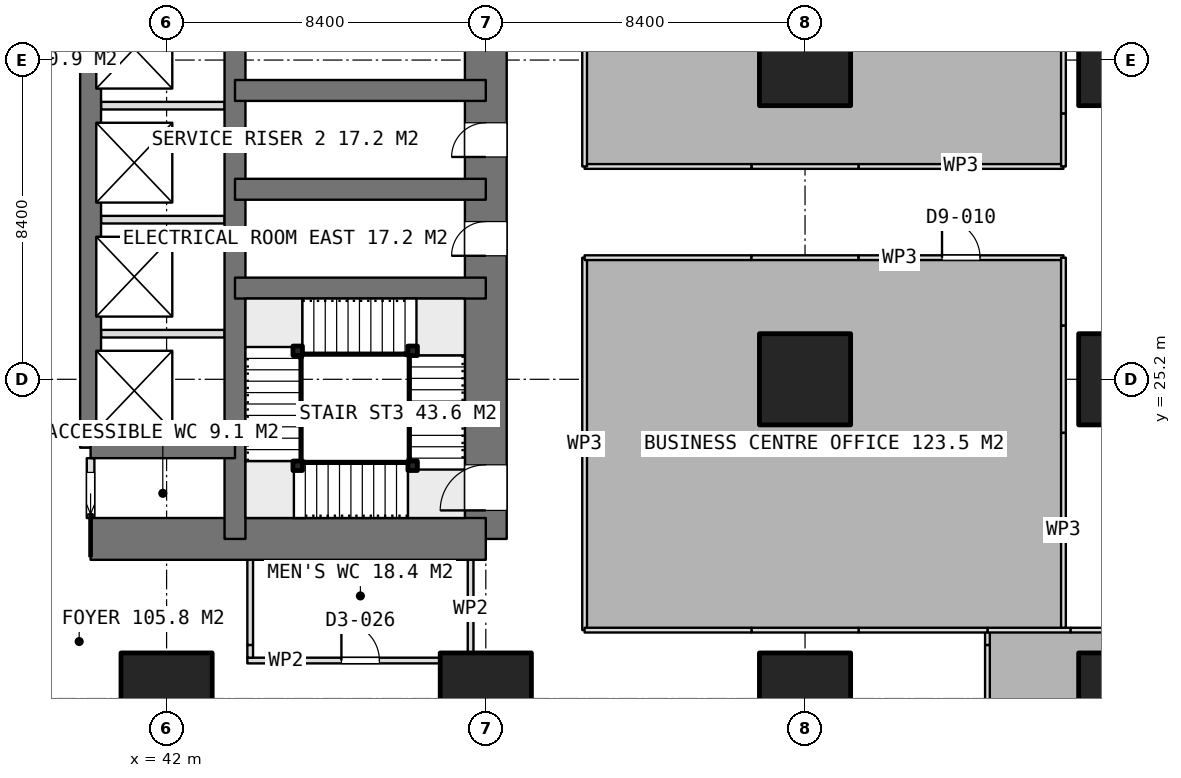
"""IFC4 building model, lengths in metres.
Left out: names, types, materials, properties, quantities, classifications, styles, units other than length and angle.
Written with IfcOpenShell. Run it as: python <this file> out.ifc"""

import sys

from ifc_helpers import new_model, si_unit, direction, frame, frame_2d, origin, origin_2d, place, context, subcontext, project, spatial, rectangle, extrude, element, fill, save


model = new_model("IFC4")
c1 = context("Model", 3, precision=1e-05, world=origin(), true_north=direction((0.0, 1.0)))
c2 = subcontext(c1, "Body", "Model", "MODEL_VIEW")
j1 = project(units=[si_unit("LENGTHUNIT", "METRE"), si_unit("PLANEANGLEUNIT", "RADIAN")], contexts=[c1])
p1 = place(None, origin())
s1 = spatial("IfcSite", under=j1, at=p1, CompositionType="ELEMENT")
p2 = place(p1, origin())
s2 = spatial("IfcBuilding", under=s1, at=p2, CompositionType="ELEMENT")
p3 = place(p2, frame((0.0, 0.0, 20.4)))
s3 = spatial("IfcBuildingStorey", under=s2, at=p3, CompositionType="ELEMENT", Elevation=20.4)
p4 = place(p3, frame((40.0, 21.0, 0.0), z_axis=(0.0, 0.0, 1.0), x_axis=(1.0, 0.0, 0.0)))
e1 = element("IfcWall", 1, at=p4, inside=s3, PredefinedType="SHEAR", context=c2, shape_type="SweptSolid", body=[
    extrude(rectangle(XDim=10.4, YDim=1.1, at=frame_2d((5.2, 0.0))), origin(), (0.0, 0.0, 1.0), 5.0),
])
p5 = place(p3, frame((50.4, 21.0, 0.0), z_axis=(0.0, 0.0, 1.0), x_axis=(0.0, 1.0, 0.0)))
e2 = element("IfcWall", 2, at=p5, inside=s3, PredefinedType="SHEAR", context=c2, shape_type="SweptSolid", body=[
    extrude(rectangle(XDim=25.2, YDim=1.1, at=frame_2d((12.6, 0.0))), origin(), (0.0, 0.0, 1.0), 5.0),
])
p6 = place(p5, frame((16.2, 0.0, 0.0)))
e3 = element("IfcOpeningElement", 3, at=p6, cuts=e2, PredefinedType="OPENING", context=c2, shape_type="SweptSolid", body=[
    extrude(rectangle(XDim=1.2, YDim=2.1, at=frame_2d((0.6, 1.05))), frame((0.0, 0.56, 0.0), z_axis=(0.0, -1.0, 0.0), x_axis=(1.0, 0.0, 0.0)), (0.0, 0.0, 1.0), 1.12),
])
p7 = place(p5, frame((10.05, 0.0, 0.0)))
e4 = element("IfcOpeningElement", 4, at=p7, cuts=e2, PredefinedType="OPENING", context=c2, shape_type="SweptSolid", body=[
    extrude(rectangle(XDim=0.9, YDim=2.1, at=frame_2d((0.45, 1.05))), frame((0.0, 0.56, 0.0), z_axis=(0.0, -1.0, 0.0), x_axis=(1.0, 0.0, 0.0)), (0.0, 0.0, 1.0), 1.12),
])
p8 = place(p5, frame((7.45, 0.0, 0.0)))
e5 = element("IfcOpeningElement", 5, at=p8, cuts=e2, PredefinedType="OPENING", context=c2, shape_type="SweptSolid", body=[
    extrude(rectangle(XDim=0.9, YDim=2.1, at=frame_2d((0.45, 1.05))), frame((0.0, 0.56, 0.0), z_axis=(0.0, -1.0, 0.0), x_axis=(1.0, 0.0, 0.0)), (0.0, 0.0, 1.0), 1.12),
])
p9 = place(p5, frame((0.75, 0.0, 0.0)))
e6 = element("IfcOpeningElement", 6, at=p9, cuts=e2, PredefinedType="OPENING", context=c2, shape_type="SweptSolid", body=[
    extrude(rectangle(XDim=1.2, YDim=2.1, at=frame_2d((0.6, 1.05))), frame((0.0, 0.56, 0.0), z_axis=(0.0, -1.0, 0.0), x_axis=(1.0, 0.0, 0.0)), (0.0, 0.0, 1.0), 1.12),
])
p10 = place(p3, frame((43.8, 21.0, 0.0), z_axis=(0.0, 0.0, 1.0), x_axis=(0.0, 1.0, 0.0)))
e7 = element("IfcWall", 7, at=p10, inside=s3, PredefinedType="SHEAR", context=c2, shape_type="SweptSolid", body=[
    extrude(rectangle(XDim=25.2, YDim=0.55, at=frame_2d((12.6, 0.0))), origin(), (0.0, 0.0, 1.0), 5.0),
])
p11 = place(p3, frame((40.0, 23.4, 0.0), z_axis=(0.0, 0.0, 1.0), x_axis=(0.0, 1.0, 0.0)))
e8 = element("IfcWall", 8, at=p11, inside=s3, PredefinedType="SHEAR", context=c2, shape_type="SweptSolid", body=[
    extrude(rectangle(XDim=18.0, YDim=0.55, at=frame_2d((9.0, 0.0))), origin(), (0.0, 0.0, 1.0), 5.0),
])
p12 = place(p3, frame((40.0, 23.4, 0.0), z_axis=(0.0, 0.0, 1.0), x_axis=(1.0, 0.0, 0.0)))
e9 = element("IfcWall", 9, at=p12, inside=s3, PredefinedType="SHEAR", context=c2, shape_type="SweptSolid", body=[
    extrude(rectangle(XDim=3.8, YDim=0.55, at=frame_2d((1.9, 0.0))), origin(), (0.0, 0.0, 1.0), 5.0),
])
for number, where, z_axis, x_axis in (
    (10, (43.8, 27.6, 0.0), (0.0, 0.0, 1.0), (1.0, 0.0, 0.0)),
    (11, (43.8, 30.2, 0.0), (0.0, 0.0, 1.0), (1.0, 0.0, 0.0)),
    (12, (43.8, 32.8, 0.0), (0.0, 0.0, 1.0), (1.0, 0.0, 0.0)),
):
    element("IfcWall", number, at=place(p3, frame(where, z_axis=z_axis, x_axis=x_axis)), inside=s3, PredefinedType="SHEAR", context=c2, shape_type="SweptSolid", body=[
        extrude(rectangle(XDim=6.6, YDim=0.55, at=frame_2d((3.3, 0.0))), origin(), (0.0, 0.0, 1.0), 5.0),
    ])
for number, where, z_axis, x_axis in (
    (13, (42.0, 16.8, 0.0), (0.0, 0.0, 1.0), (1.0, 0.0, 0.0)),
    (14, (50.4, 16.8, 0.0), (0.0, 0.0, 1.0), (1.0, 0.0, 0.0)),
    (15, (58.8, 16.8, 0.0), (0.0, 0.0, 1.0), (1.0, 0.0, 0.0)),
    (16, (58.8, 25.2, 0.0), (0.0, 0.0, 1.0), (1.0, 0.0, 0.0)),
    (17, (58.8, 33.6, 0.0), (0.0, 0.0, 1.0), (1.0, 0.0, 0.0)),
    (18, (67.2, 16.8, 0.0), (0.0, 0.0, 1.0), (1.0, 0.0, 0.0)),
    (19, (67.2, 25.2, 0.0), (0.0, 0.0, 1.0), (1.0, 0.0, 0.0)),
    (20, (67.2, 33.6, 0.0), (0.0, 0.0, 1.0), (1.0, 0.0, 0.0)),
):
    element("IfcColumn", number, at=place(p3, frame(where, z_axis=z_axis, x_axis=x_axis)), inside=s3, PredefinedType="COLUMN", context=c2, shape_type="SweptSolid", body=[
        extrude(rectangle(XDim=2.4, YDim=2.4, at=origin_2d()), origin(), (0.0, 0.0, 1.0), 5.0),
    ])
for number, where, z_axis, x_axis in (
    (21, (40.275, 26.4, 0.0), (0.0, 0.0, 1.0), (1.0, 0.0, 0.0)),
    (22, (40.275, 29.4, 0.0), (0.0, 0.0, 1.0), (1.0, 0.0, 0.0)),
    (23, (40.275, 32.4, 0.0), (0.0, 0.0, 1.0), (1.0, 0.0, 0.0)),
):
    element("IfcWall", number, at=place(p3, frame(where, z_axis=z_axis, x_axis=x_axis)), inside=s3, PredefinedType="PARTITIONING", context=c2, shape_type="SweptSolid", body=[
        extrude(rectangle(XDim=3.25, YDim=0.2, at=frame_2d((1.625, 0.0))), origin(), (0.0, 0.0, 1.0), 4.6),
    ])
p13 = place(p3, frame((40.0, 21.55, 0.0), z_axis=(0.0, 0.0, 1.0), x_axis=(0.0, 1.0, 0.0)))
e24 = element("IfcWall", 24, at=p13, inside=s3, PredefinedType="PARTITIONING", context=c2, shape_type="SweptSolid", body=[
    extrude(rectangle(XDim=1.575, YDim=0.2, at=frame_2d((0.788, 0.0))), origin(), (0.0, 0.0, 1.0), 4.6),
])
p14 = place(p13, frame((0.1, 0.0, 0.0)))
e25 = element("IfcOpeningElement", 25, at=p14, cuts=e24, PredefinedType="OPENING", context=c2, shape_type="SweptSolid", body=[
    extrude(rectangle(XDim=1.1, YDim=2.1, at=frame_2d((0.55, 1.05))), frame((0.0, 0.11, 0.0), z_axis=(0.0, -1.0, 0.0), x_axis=(1.0, 0.0, 0.0)), (0.0, 0.0, 1.0), 0.22),
])
p15 = place(p3, frame((44.125, 17.8, 0.0), z_axis=(0.0, 0.0, 1.0), x_axis=(1.0, 0.0, 0.0)))
e26 = element("IfcWall", 26, at=p15, inside=s3, PredefinedType="PARTITIONING", context=c2, shape_type="SweptSolid", body=[
    extrude(rectangle(XDim=5.075, YDim=0.15, at=frame_2d((2.538, 0.0))), origin(), (0.0, 0.0, 1.0), 2.8),
])
p16 = place(p15, frame((2.475, 0.0, 0.0)))
e27 = element("IfcOpeningElement", 27, at=p16, cuts=e26, PredefinedType="OPENING", context=c2, shape_type="SweptSolid", body=[
    extrude(rectangle(XDim=1.0, YDim=2.1, at=frame_2d((0.5, 1.05))), frame((0.0, 0.085, 0.0), z_axis=(0.0, -1.0, 0.0), x_axis=(1.0, 0.0, 0.0)), (0.0, 0.0, 1.0), 0.17),
])
p17 = place(p3, frame((49.2, 17.8, 0.0), z_axis=(0.0, 0.0, 1.0), x_axis=(1.0, 0.0, 0.0)))
e28 = element("IfcWall", 28, at=p17, inside=s3, PredefinedType="PARTITIONING", context=c2, shape_type="SweptSolid", body=[
    extrude(rectangle(XDim=0.875, YDim=0.15, at=frame_2d((0.438, 0.0))), origin(), (0.0, 0.0, 1.0), 4.6),
])
p18 = place(p3, frame((44.2, 17.875, 0.0), z_axis=(0.0, 0.0, 1.0), x_axis=(0.0, 1.0, 0.0)))
e29 = element("IfcWall", 29, at=p18, inside=s3, PredefinedType="PARTITIONING", context=c2, shape_type="SweptSolid", body=[
    extrude(rectangle(XDim=0.335, YDim=0.15, at=frame_2d((0.167, 0.0))), origin(), (0.0, 0.0, 1.0), 2.8),
])
p19 = place(p3, frame((44.2, 18.21, 0.0), z_axis=(0.0, 0.0, 1.0), x_axis=(0.0, 1.0, 0.0)))
e30 = element("IfcWall", 30, at=p19, inside=s3, PredefinedType="PARTITIONING", context=c2, shape_type="SweptSolid", body=[
    extrude(rectangle(XDim=2.24, YDim=0.15, at=frame_2d((1.12, 0.0))), origin(), (0.0, 0.0, 1.0), 4.6),
])
p20 = place(p3, frame((50.0, 17.875, 0.0), z_axis=(0.0, 0.0, 1.0), x_axis=(0.0, 1.0, 0.0)))
e31 = element("IfcWall", 31, at=p20, inside=s3, PredefinedType="PARTITIONING", context=c2, shape_type="SweptSolid", body=[
    extrude(rectangle(XDim=2.575, YDim=0.15, at=frame_2d((1.288, 0.0))), origin(), (0.0, 0.0, 1.0), 4.6),
])
p21 = place(p3, frame((63.6, 15.39, 0.0), z_axis=(0.0, 0.0, 1.0), x_axis=(0.0, 1.0, 0.0)))
e32 = element("IfcWall", 32, at=p21, inside=s3, PredefinedType="PARTITIONING", context=c2, shape_type="SweptSolid", body=[
    extrude(rectangle(XDim=2.82, YDim=0.125, at=frame_2d((1.41, 0.0))), origin(), (0.0, 0.0, 1.0), 2.8),
])
p22 = place(p3, frame((63.6, 18.21, 0.0), z_axis=(0.0, 0.0, 1.0), x_axis=(0.0, 1.0, 0.0)))
e33 = element("IfcWall", 33, at=p22, inside=s3, PredefinedType="PARTITIONING", context=c2, shape_type="SweptSolid", body=[
    extrude(rectangle(XDim=0.39, YDim=0.125, at=frame_2d((0.195, 0.0))), origin(), (0.0, 0.0, 1.0), 4.6),
])
p23 = place(p3, frame((63.6, 18.6, 0.0), z_axis=(0.0, 0.0, 1.0), x_axis=(1.0, 0.0, 0.0)))
e34 = element("IfcWall", 34, at=p23, inside=s3, PredefinedType="PARTITIONING", context=c2, shape_type="SweptSolid", body=[
    extrude(rectangle(XDim=2.19, YDim=0.125, at=frame_2d((1.095, 0.0))), origin(), (0.0, 0.0, 1.0), 4.6),
])
p24 = place(p3, frame((65.79, 18.6, 0.0), z_axis=(0.0, 0.0, 1.0), x_axis=(1.0, 0.0, 0.0)))
e35 = element("IfcWall", 35, at=p24, inside=s3, PredefinedType="PARTITIONING", context=c2, shape_type="SweptSolid", body=[
    extrude(rectangle(XDim=2.82, YDim=0.125, at=frame_2d((1.41, 0.0))), origin(), (0.0, 0.0, 1.0), 2.8),
])
p25 = place(p3, frame((53.0, 18.6, 0.0), z_axis=(0.0, 0.0, 1.0), x_axis=(0.0, 1.0, 0.0)))
e36 = element("IfcWall", 36, at=p25, inside=s3, PredefinedType="PARTITIONING", context=c2, shape_type="SweptSolid", body=[
    extrude(rectangle(XDim=9.8, YDim=0.125, at=frame_2d((4.9, 0.0))), origin(), (0.0, 0.0, 1.0), 4.6),
])
p26 = place(p3, frame((53.0, 28.4, 0.0), z_axis=(0.0, 0.0, 1.0), x_axis=(1.0, 0.0, 0.0)))
e37 = element("IfcWall", 37, at=p26, inside=s3, PredefinedType="PARTITIONING", context=c2, shape_type="SweptSolid", body=[
    extrude(rectangle(XDim=4.39, YDim=0.125, at=frame_2d((2.195, 0.0))), origin(), (0.0, 0.0, 1.0), 4.6),
])
p27 = place(p3, frame((57.39, 28.4, 0.0), z_axis=(0.0, 0.0, 1.0), x_axis=(1.0, 0.0, 0.0)))
e38 = element("IfcWall", 38, at=p27, inside=s3, PredefinedType="PARTITIONING", context=c2, shape_type="SweptSolid", body=[
    extrude(rectangle(XDim=2.82, YDim=0.125, at=frame_2d((1.41, 0.0))), origin(), (0.0, 0.0, 1.0), 2.8),
])
p28 = place(p3, frame((60.21, 28.4, 0.0), z_axis=(0.0, 0.0, 1.0), x_axis=(1.0, 0.0, 0.0)))
e39 = element("IfcWall", 39, at=p28, inside=s3, PredefinedType="PARTITIONING", context=c2, shape_type="SweptSolid", body=[
    extrude(rectangle(XDim=5.39, YDim=0.125, at=frame_2d((2.695, 0.0))), origin(), (0.0, 0.0, 1.0), 4.6),
])
p29 = place(p28, frame((2.195, 0.0, 0.0)))
e40 = element("IfcOpeningElement", 40, at=p29, cuts=e39, PredefinedType="OPENING", context=c2, shape_type="SweptSolid", body=[
    extrude(rectangle(XDim=1.0, YDim=2.1, at=frame_2d((0.5, 1.05))), frame((0.0, 0.073, 0.0), z_axis=(0.0, -1.0, 0.0), x_axis=(1.0, 0.0, 0.0)), (0.0, 0.0, 1.0), 0.145),
])
p30 = place(p3, frame((65.6, 28.4, 0.0), z_axis=(0.0, 0.0, 1.0), x_axis=(0.0, -1.0, 0.0)))
e41 = element("IfcWall", 41, at=p30, inside=s3, PredefinedType="PARTITIONING", context=c2, shape_type="SweptSolid", body=[
    extrude(rectangle(XDim=1.79, YDim=0.125, at=frame_2d((0.895, 0.0))), origin(), (0.0, 0.0, 1.0), 4.6),
])
p31 = place(p3, frame((65.6, 26.61, 0.0), z_axis=(0.0, 0.0, 1.0), x_axis=(0.0, -1.0, 0.0)))
e42 = element("IfcWall", 42, at=p31, inside=s3, PredefinedType="PARTITIONING", context=c2, shape_type="SweptSolid", body=[
    extrude(rectangle(XDim=2.82, YDim=0.125, at=frame_2d((1.41, 0.0))), origin(), (0.0, 0.0, 1.0), 2.8),
])
p32 = place(p3, frame((65.6, 23.79, 0.0), z_axis=(0.0, 0.0, 1.0), x_axis=(0.0, -1.0, 0.0)))
e43 = element("IfcWall", 43, at=p32, inside=s3, PredefinedType="PARTITIONING", context=c2, shape_type="SweptSolid", body=[
    extrude(rectangle(XDim=5.127, YDim=0.125, at=frame_2d((2.563, 0.0))), origin(), (0.0, 0.0, 1.0), 4.6),
])
p33 = place(p3, frame((63.6, 18.6, 0.0), z_axis=(0.0, 0.0, 1.0), x_axis=(-1.0, 0.0, 0.0)))
e44 = element("IfcWall", 44, at=p33, inside=s3, PredefinedType="PARTITIONING", context=c2, shape_type="SweptSolid", body=[
    extrude(rectangle(XDim=3.39, YDim=0.125, at=frame_2d((1.695, 0.0))), origin(), (0.0, 0.0, 1.0), 4.6),
])
p34 = place(p3, frame((60.21, 18.6, 0.0), z_axis=(0.0, 0.0, 1.0), x_axis=(-1.0, 0.0, 0.0)))
e45 = element("IfcWall", 45, at=p34, inside=s3, PredefinedType="PARTITIONING", context=c2, shape_type="SweptSolid", body=[
    extrude(rectangle(XDim=2.82, YDim=0.125, at=frame_2d((1.41, 0.0))), origin(), (0.0, 0.0, 1.0), 2.8),
])
p35 = place(p3, frame((57.39, 18.6, 0.0), z_axis=(0.0, 0.0, 1.0), x_axis=(-1.0, 0.0, 0.0)))
e46 = element("IfcWall", 46, at=p35, inside=s3, PredefinedType="PARTITIONING", context=c2, shape_type="SweptSolid", body=[
    extrude(rectangle(XDim=4.39, YDim=0.125, at=frame_2d((2.195, 0.0))), origin(), (0.0, 0.0, 1.0), 4.6),
])
p36 = place(p3, frame((65.6, 30.8, 0.0), z_axis=(0.0, 0.0, 1.0), x_axis=(-1.0, 0.0, 0.0)))
e47 = element("IfcWall", 47, at=p36, inside=s3, PredefinedType="PARTITIONING", context=c2, shape_type="SweptSolid", body=[
    extrude(rectangle(XDim=5.39, YDim=0.125, at=frame_2d((2.695, 0.0))), origin(), (0.0, 0.0, 1.0), 4.6),
])
p37 = place(p3, frame((60.21, 30.8, 0.0), z_axis=(0.0, 0.0, 1.0), x_axis=(-1.0, 0.0, 0.0)))
e48 = element("IfcWall", 48, at=p37, inside=s3, PredefinedType="PARTITIONING", context=c2, shape_type="SweptSolid", body=[
    extrude(rectangle(XDim=2.82, YDim=0.125, at=frame_2d((1.41, 0.0))), origin(), (0.0, 0.0, 1.0), 2.8),
])
p38 = place(p3, frame((57.39, 30.8, 0.0), z_axis=(0.0, 0.0, 1.0), x_axis=(-1.0, 0.0, 0.0)))
e49 = element("IfcWall", 49, at=p38, inside=s3, PredefinedType="PARTITIONING", context=c2, shape_type="SweptSolid", body=[
    extrude(rectangle(XDim=4.39, YDim=0.125, at=frame_2d((2.195, 0.0))), origin(), (0.0, 0.0, 1.0), 4.6),
])
p39 = place(p3, frame((53.0, 30.8, 0.0), z_axis=(0.0, 0.0, 1.0), x_axis=(0.0, 1.0, 0.0)))
e50 = element("IfcWall", 50, at=p39, inside=s3, PredefinedType="PARTITIONING", context=c2, shape_type="SweptSolid", body=[
    extrude(rectangle(XDim=9.8, YDim=0.125, at=frame_2d((4.9, 0.0))), origin(), (0.0, 0.0, 1.0), 4.6),
])
p40 = place(p39, frame((4.4, 0.0, 0.0)))
e51 = element("IfcOpeningElement", 51, at=p40, cuts=e50, PredefinedType="OPENING", context=c2, shape_type="SweptSolid", body=[
    extrude(rectangle(XDim=1.0, YDim=2.1, at=frame_2d((0.5, 1.05))), frame((0.0, 0.073, 0.0), z_axis=(0.0, -1.0, 0.0), x_axis=(1.0, 0.0, 0.0)), (0.0, 0.0, 1.0), 0.145),
])
p41 = place(p3, frame((65.6, 35.01, 0.0), z_axis=(0.0, 0.0, 1.0), x_axis=(0.0, -1.0, 0.0)))
e52 = element("IfcWall", 52, at=p41, inside=s3, PredefinedType="PARTITIONING", context=c2, shape_type="SweptSolid", body=[
    extrude(rectangle(XDim=2.82, YDim=0.125, at=frame_2d((1.41, 0.0))), origin(), (0.0, 0.0, 1.0), 2.8),
])
p42 = place(p3, frame((65.6, 32.19, 0.0), z_axis=(0.0, 0.0, 1.0), x_axis=(0.0, -1.0, 0.0)))
e53 = element("IfcWall", 53, at=p42, inside=s3, PredefinedType="PARTITIONING", context=c2, shape_type="SweptSolid", body=[
    extrude(rectangle(XDim=1.39, YDim=0.125, at=frame_2d((0.695, 0.0))), origin(), (0.0, 0.0, 1.0), 4.6),
])
for number, where, z_axis, x_axis in (
    (54, (48.475, 22.925, 0.0), (0.0, 0.0, 1.0), (1.0, 0.0, 0.0)),
    (55, (45.45, 22.925, 0.0), (0.0, 0.0, 1.0), (1.0, 0.0, 0.0)),
    (56, (45.45, 25.95, 0.0), (0.0, 0.0, 1.0), (1.0, 0.0, 0.0)),
    (57, (48.475, 25.95, 0.0), (0.0, 0.0, 1.0), (1.0, 0.0, 0.0)),
):
    element("IfcColumn", number, at=place(p3, frame(where, z_axis=z_axis, x_axis=x_axis)), inside=s3, PredefinedType="COLUMN", context=c2, shape_type="SweptSolid", body=[
        extrude(rectangle(XDim=0.25, YDim=0.25, at=origin_2d()), origin(), (0.0, 0.0, 1.0), 5.0),
    ])
p43 = place(p7, origin())
e58 = element("IfcDoor", 58, at=p43, inside=s3, OperationType="SINGLE_SWING_LEFT", PredefinedType="DOOR", context=c2, shape_type="SweptSolid", body=[
    extrude(rectangle(XDim=0.9, YDim=2.1, at=frame_2d((0.45, 1.05))), frame((0.0, 0.025, 0.0), z_axis=(0.0, -1.0, 0.0), x_axis=(1.0, 0.0, 0.0)), (0.0, 0.0, 1.0), 0.05),
])
fill(e4, e58)
p44 = place(p8, origin())
e59 = element("IfcDoor", 59, at=p44, inside=s3, OperationType="SINGLE_SWING_LEFT", PredefinedType="DOOR", context=c2, shape_type="SweptSolid", body=[
    extrude(rectangle(XDim=0.9, YDim=2.1, at=frame_2d((0.45, 1.05))), frame((0.0, 0.025, 0.0), z_axis=(0.0, -1.0, 0.0), x_axis=(1.0, 0.0, 0.0)), (0.0, 0.0, 1.0), 0.05),
])
fill(e5, e59)
p45 = place(p14, origin())
e60 = element("IfcDoor", 60, at=p45, inside=s3, OperationType="SLIDING_TO_LEFT", PredefinedType="DOOR", context=c2, shape_type="SweptSolid", body=[
    extrude(rectangle(XDim=1.1, YDim=2.1, at=frame_2d((0.55, 1.05))), frame((0.0, 0.025, 0.0), z_axis=(0.0, -1.0, 0.0), x_axis=(1.0, 0.0, 0.0)), (0.0, 0.0, 1.0), 0.05),
])
fill(e25, e60)
p46 = place(p16, origin())
e61 = element("IfcDoor", 61, at=p46, inside=s3, OperationType="SINGLE_SWING_LEFT", PredefinedType="DOOR", context=c2, shape_type="SweptSolid", body=[
    extrude(rectangle(XDim=1.0, YDim=2.1, at=frame_2d((0.5, 1.05))), frame((0.0, 0.025, 0.0), z_axis=(0.0, -1.0, 0.0), x_axis=(1.0, 0.0, 0.0)), (0.0, 0.0, 1.0), 0.05),
])
fill(e27, e61)
p47 = place(p29, origin())
e62 = element("IfcDoor", 62, at=p47, inside=s3, OperationType="SINGLE_SWING_LEFT", PredefinedType="DOOR", context=c2, shape_type="SweptSolid", body=[
    extrude(rectangle(XDim=1.0, YDim=2.1, at=frame_2d((0.5, 1.05))), frame((0.0, 0.025, 0.0), z_axis=(0.0, -1.0, 0.0), x_axis=(1.0, 0.0, 0.0)), (0.0, 0.0, 1.0), 0.05),
])
fill(e40, e62)
p48 = place(p9, origin())
e63 = element("IfcDoor", 63, at=p48, inside=s3, OperationType="SINGLE_SWING_RIGHT", PredefinedType="DOOR", context=c2, shape_type="SweptSolid", body=[
    extrude(rectangle(XDim=1.2, YDim=2.1, at=frame_2d((0.6, 1.05))), frame((0.0, 0.025, 0.0), z_axis=(0.0, -1.0, 0.0), x_axis=(1.0, 0.0, 0.0)), (0.0, 0.0, 1.0), 0.05),
])
fill(e6, e63)
save(model, sys.argv[1])
